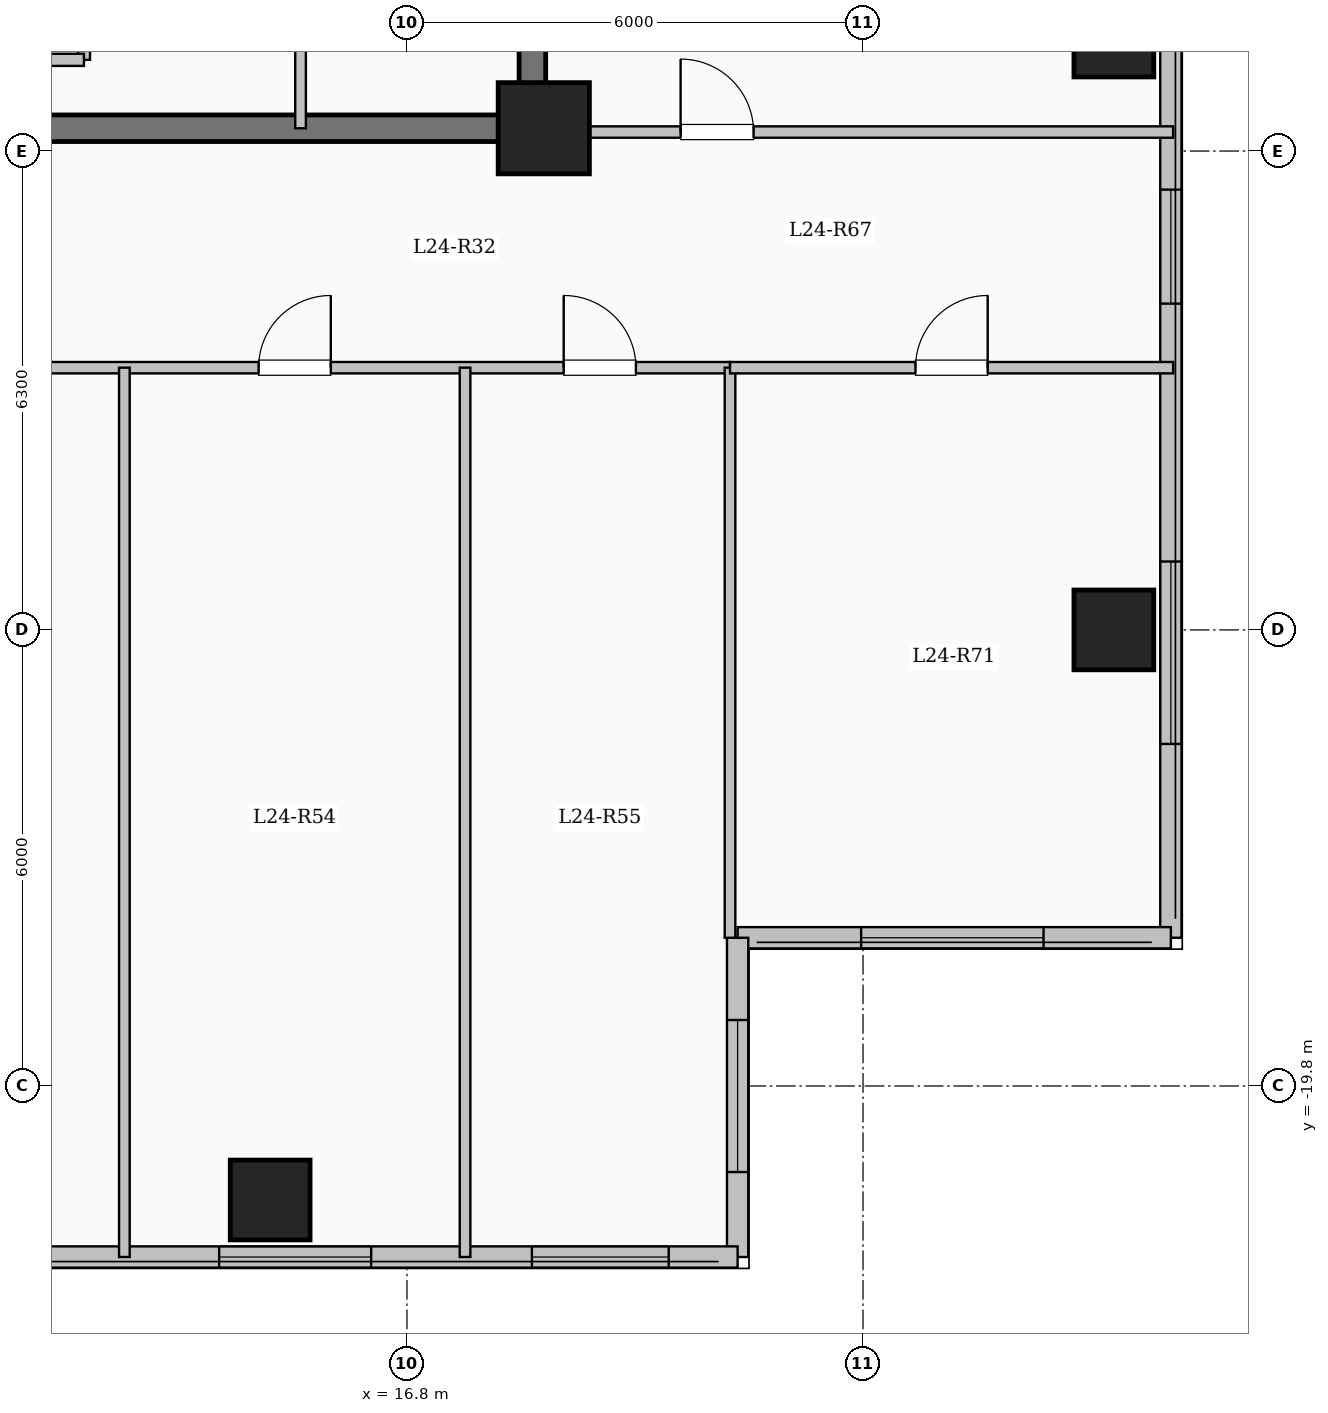
"""IFC4 building model, lengths in metres.
Left out: names, types, materials, properties, quantities, classifications, styles, units other than length and angle.
Written with IfcOpenShell. Run it as: python <this file> out.ifc"""

import sys

from ifc_helpers import new_model, si_unit, direction, frame, frame_2d, origin, origin_2d, place, context, subcontext, project, spatial, rectangle, extrude, element, fill, save


model = new_model("IFC4")
c1 = context("Model", 3, precision=1e-05, world=origin(), true_north=direction((0.0, 1.0)))
c2 = subcontext(c1, "Body", "Model", "MODEL_VIEW")
j1 = project(units=[si_unit("LENGTHUNIT", "METRE"), si_unit("PLANEANGLEUNIT", "RADIAN")], contexts=[c1])
p1 = place(None, origin())
s1 = spatial("IfcSite", under=j1, at=p1, CompositionType="ELEMENT")
p2 = place(p1, origin())
s2 = spatial("IfcBuilding", under=s1, at=p2, CompositionType="ELEMENT")
p3 = place(p2, frame((0.0, 0.0, 91.7)))
s3 = spatial("IfcBuildingStorey", under=s2, at=p3, CompositionType="ELEMENT", Elevation=91.7)
p4 = place(p3, frame((18.6, -7.2, 0.0), z_axis=(0.0, 0.0, 1.0), x_axis=(1.0, 0.0, 0.0)))
e1 = element("IfcColumn", 1, at=p4, inside=s3, PredefinedType="COLUMN", context=c2, shape_type="SweptSolid", body=[
    extrude(rectangle(XDim=1.2, YDim=1.2, at=origin_2d()), origin(), (0.0, 0.0, 1.0), 3.35),
])
for number, where, z_axis, x_axis in (
    (2, (15.0, -21.3, 0.0), (0.0, 0.0, 1.0), (1.0, 0.0, 0.0)),
    (3, (26.1, -13.8, 0.0), (0.0, 0.0, 1.0), (1.0, 0.0, 0.0)),
    (4, (26.1, -6.0, 0.0), (0.0, 0.0, 1.0), (1.0, 0.0, 0.0)),
):
    element("IfcColumn", number, at=place(p3, frame(where, z_axis=z_axis, x_axis=x_axis)), inside=s3, PredefinedType="COLUMN", context=c2, shape_type="SweptSolid", body=[
        extrude(rectangle(XDim=1.05, YDim=1.05, at=origin_2d()), origin(), (0.0, 0.0, 1.0), 3.35),
    ])
p5 = place(p3, frame((26.85, 17.85, 0.0), z_axis=(0.0, 0.0, 1.0), x_axis=(0.0, -1.0, 0.0)))
e5 = element("IfcWall", 5, at=p5, inside=s3, PredefinedType="SOLIDWALL", context=c2, shape_type="SweptSolid", body=[
    extrude(rectangle(XDim=35.7, YDim=0.28, at=frame_2d((17.85, 0.0))), origin(), (0.0, 0.0, 1.0), 3.1),
])
p6 = place(p5, frame((1.675, 0.0, 0.9)))
e6 = element("IfcOpeningElement", 6, at=p6, cuts=e5, PredefinedType="OPENING", context=c2, shape_type="SweptSolid", body=[
    extrude(rectangle(XDim=2.0, YDim=1.7, at=frame_2d((1.0, 0.85))), frame((0.0, 0.15, 0.0), z_axis=(0.0, -1.0, 0.0), x_axis=(1.0, 0.0, 0.0)), (0.0, 0.0, 1.0), 0.3),
])
p7 = place(p5, frame((5.725, 0.0, 0.95)))
e7 = element("IfcOpeningElement", 7, at=p7, cuts=e5, PredefinedType="OPENING", context=c2, shape_type="SweptSolid", body=[
    extrude(rectangle(XDim=1.0, YDim=1.5, at=frame_2d((0.5, 0.75))), frame((0.0, 0.15, 0.0), z_axis=(0.0, -1.0, 0.0), x_axis=(1.0, 0.0, 0.0)), (0.0, 0.0, 1.0), 0.3),
])
p8 = place(p5, frame((8.975, 0.0, 0.9)))
e8 = element("IfcOpeningElement", 8, at=p8, cuts=e5, PredefinedType="OPENING", context=c2, shape_type="SweptSolid", body=[
    extrude(rectangle(XDim=2.0, YDim=1.7, at=frame_2d((1.0, 0.85))), frame((0.0, 0.15, 0.0), z_axis=(0.0, -1.0, 0.0), x_axis=(1.0, 0.0, 0.0)), (0.0, 0.0, 1.0), 0.3),
])
p9 = place(p5, frame((13.725, 0.0, 0.9)))
e9 = element("IfcOpeningElement", 9, at=p9, cuts=e5, PredefinedType="OPENING", context=c2, shape_type="SweptSolid", body=[
    extrude(rectangle(XDim=1.8, YDim=1.65, at=frame_2d((0.9, 0.825))), frame((0.0, 0.15, 0.0), z_axis=(0.0, -1.0, 0.0), x_axis=(1.0, 0.0, 0.0)), (0.0, 0.0, 1.0), 0.3),
])
p10 = place(p5, frame((19.55, 0.0, 0.9)))
e10 = element("IfcOpeningElement", 10, at=p10, cuts=e5, PredefinedType="OPENING", context=c2, shape_type="SweptSolid", body=[
    extrude(rectangle(XDim=2.4, YDim=1.8, at=frame_2d((1.2, 0.9))), frame((0.0, 0.15, 0.0), z_axis=(0.0, -1.0, 0.0), x_axis=(1.0, 0.0, 0.0)), (0.0, 0.0, 1.0), 0.3),
])
p11 = place(p5, frame((25.857, 0.0, 0.9)))
e11 = element("IfcOpeningElement", 11, at=p11, cuts=e5, PredefinedType="OPENING", context=c2, shape_type="SweptSolid", body=[
    extrude(rectangle(XDim=1.5, YDim=1.65, at=frame_2d((0.75, 0.825))), frame((0.0, 0.15, 0.0), z_axis=(0.0, -1.0, 0.0), x_axis=(1.0, 0.0, 0.0)), (0.0, 0.0, 1.0), 0.3),
])
p12 = place(p5, frame((30.75, 0.0, 0.9)))
e12 = element("IfcOpeningElement", 12, at=p12, cuts=e5, PredefinedType="OPENING", context=c2, shape_type="SweptSolid", body=[
    extrude(rectangle(XDim=2.4, YDim=1.8, at=frame_2d((1.2, 0.9))), frame((0.0, 0.15, 0.0), z_axis=(0.0, -1.0, 0.0), x_axis=(1.0, 0.0, 0.0)), (0.0, 0.0, 1.0), 0.3),
])
p13 = place(p3, frame((26.85, -17.85, 0.0), z_axis=(0.0, 0.0, 1.0), x_axis=(-1.0, 0.0, 0.0)))
e13 = element("IfcWall", 13, at=p13, inside=s3, PredefinedType="SOLIDWALL", context=c2, shape_type="SweptSolid", body=[
    extrude(rectangle(XDim=5.7, YDim=0.28, at=frame_2d((2.85, 0.0))), origin(), (0.0, 0.0, 1.0), 3.1),
])
p14 = place(p13, frame((1.675, 0.0, 0.9)))
e14 = element("IfcOpeningElement", 14, at=p14, cuts=e13, PredefinedType="OPENING", context=c2, shape_type="SweptSolid", body=[
    extrude(rectangle(XDim=2.4, YDim=1.8, at=frame_2d((1.2, 0.9))), frame((0.0, 0.15, 0.0), z_axis=(0.0, -1.0, 0.0), x_axis=(1.0, 0.0, 0.0)), (0.0, 0.0, 1.0), 0.3),
])
p15 = place(p3, frame((21.15, -17.85, 0.0), z_axis=(0.0, 0.0, 1.0), x_axis=(0.0, -1.0, 0.0)))
e15 = element("IfcWall", 15, at=p15, inside=s3, PredefinedType="SOLIDWALL", context=c2, shape_type="SweptSolid", body=[
    extrude(rectangle(XDim=4.2, YDim=0.28, at=frame_2d((2.1, 0.0))), origin(), (0.0, 0.0, 1.0), 3.1),
])
p16 = place(p15, frame((1.082, 0.0, 0.9)))
e16 = element("IfcOpeningElement", 16, at=p16, cuts=e15, PredefinedType="OPENING", context=c2, shape_type="SweptSolid", body=[
    extrude(rectangle(XDim=2.0, YDim=1.7, at=frame_2d((1.0, 0.85))), frame((0.0, 0.15, 0.0), z_axis=(0.0, -1.0, 0.0), x_axis=(1.0, 0.0, 0.0)), (0.0, 0.0, 1.0), 0.3),
])
p17 = place(p3, frame((21.15, -22.05, 0.0), z_axis=(0.0, 0.0, 1.0), x_axis=(-1.0, 0.0, 0.0)))
e17 = element("IfcWall", 17, at=p17, inside=s3, PredefinedType="SOLIDWALL", context=c2, shape_type="SweptSolid", body=[
    extrude(rectangle(XDim=13.8, YDim=0.28, at=frame_2d((6.9, 0.0))), origin(), (0.0, 0.0, 1.0), 3.1),
])
p18 = place(p17, frame((0.906, 0.0, 0.9)))
e18 = element("IfcOpeningElement", 18, at=p18, cuts=e17, PredefinedType="OPENING", context=c2, shape_type="SweptSolid", body=[
    extrude(rectangle(XDim=1.8, YDim=1.65, at=frame_2d((0.9, 0.825))), frame((0.0, 0.15, 0.0), z_axis=(0.0, -1.0, 0.0), x_axis=(1.0, 0.0, 0.0)), (0.0, 0.0, 1.0), 0.3),
])
p19 = place(p17, frame((4.821, 0.0, 0.9)))
e19 = element("IfcOpeningElement", 19, at=p19, cuts=e17, PredefinedType="OPENING", context=c2, shape_type="SweptSolid", body=[
    extrude(rectangle(XDim=2.0, YDim=1.7, at=frame_2d((1.0, 0.85))), frame((0.0, 0.15, 0.0), z_axis=(0.0, -1.0, 0.0), x_axis=(1.0, 0.0, 0.0)), (0.0, 0.0, 1.0), 0.3),
])
p20 = place(p17, frame((9.337, 0.0, 0.9)))
e20 = element("IfcOpeningElement", 20, at=p20, cuts=e17, PredefinedType="OPENING", context=c2, shape_type="SweptSolid", body=[
    extrude(rectangle(XDim=2.0, YDim=1.7, at=frame_2d((1.0, 0.85))), frame((0.0, 0.15, 0.0), z_axis=(0.0, -1.0, 0.0), x_axis=(1.0, 0.0, 0.0)), (0.0, 0.0, 1.0), 0.3),
])
p21 = place(p17, frame((12.803, 0.0, 0.95)))
e21 = element("IfcOpeningElement", 21, at=p21, cuts=e17, PredefinedType="OPENING", context=c2, shape_type="SweptSolid", body=[
    extrude(rectangle(XDim=0.85, YDim=1.5, at=frame_2d((0.425, 0.75))), frame((0.0, 0.15, 0.0), z_axis=(0.0, -1.0, 0.0), x_axis=(1.0, 0.0, 0.0)), (0.0, 0.0, 1.0), 0.3),
])
p22 = place(p3, frame((12.55, -6.3, 0.0), z_axis=(0.0, 0.0, 1.0), x_axis=(0.0, 1.0, 0.0)))
e22 = element("IfcWall", 22, at=p22, inside=s3, PredefinedType="SOLIDWALL", context=c2, shape_type="SweptSolid", body=[
    extrude(rectangle(XDim=2.6, YDim=0.16, at=frame_2d((1.3, 0.0))), origin(), (0.0, 0.0, 1.0), 3.1),
])
p23 = place(p3, frame((10.25, -6.3, 0.0), z_axis=(0.0, 0.0, 1.0), x_axis=(1.0, 0.0, 0.0)))
e23 = element("IfcWall", 23, at=p23, inside=s3, PredefinedType="SOLIDWALL", context=c2, shape_type="SweptSolid", body=[
    extrude(rectangle(XDim=2.3, YDim=0.16, at=frame_2d((1.15, 0.0))), origin(), (0.0, 0.0, 1.0), 3.1),
])
p24 = place(p3, frame((18.45, -7.375, 0.0), z_axis=(0.0, 0.0, 1.0), x_axis=(0.0, 1.0, 0.0)))
e24 = element("IfcWall", 24, at=p24, inside=s3, PredefinedType="SHEAR", context=c2, shape_type="SweptSolid", body=[
    extrude(rectangle(XDim=14.05, YDim=0.35, at=frame_2d((7.025, 0.0))), origin(), (0.0, 0.0, 1.0), 3.35),
])
p25 = place(p3, frame((10.075, -7.2, 0.0), z_axis=(0.0, 0.0, 1.0), x_axis=(1.0, 0.0, 0.0)))
e25 = element("IfcWall", 25, at=p25, inside=s3, PredefinedType="SHEAR", context=c2, shape_type="SweptSolid", body=[
    extrude(rectangle(XDim=8.55, YDim=0.35, at=frame_2d((4.275, 0.0))), origin(), (0.0, 0.0, 1.0), 3.35),
])
p26 = place(p3, frame((15.4, -7.2, 0.0), z_axis=(0.0, 0.0, 1.0), x_axis=(0.0, 1.0, 0.0)))
e26 = element("IfcWall", 26, at=p26, inside=s3, PredefinedType="PARTITIONING", context=c2, shape_type="SweptSolid", body=[
    extrude(rectangle(XDim=10.45, YDim=0.14, at=frame_2d((5.225, 0.0))), origin(), (0.0, 0.0, 1.0), 3.1),
])
p27 = place(p26, frame((9.25, 0.0, 0.0)))
e27 = element("IfcOpeningElement", 27, at=p27, cuts=e26, PredefinedType="OPENING", context=c2, shape_type="SweptSolid", body=[
    extrude(rectangle(XDim=0.9, YDim=2.08, at=frame_2d((0.45, 1.04))), frame((0.0, 0.08, 0.0), z_axis=(0.0, -1.0, 0.0), x_axis=(1.0, 0.0, 0.0)), (0.0, 0.0, 1.0), 0.16),
])
p28 = place(p3, frame((8.55, -10.35, 0.0), z_axis=(0.0, 0.0, 1.0), x_axis=(1.0, 0.0, 0.0)))
e28 = element("IfcWall", 28, at=p28, inside=s3, PredefinedType="PARTITIONING", context=c2, shape_type="SweptSolid", body=[
    extrude(rectangle(XDim=12.5, YDim=0.15, at=frame_2d((6.25, 0.0))), origin(), (0.0, 0.0, 1.0), 3.1),
])
p29 = place(p28, frame((1.786, 0.0, 0.0)))
e29 = element("IfcOpeningElement", 29, at=p29, cuts=e28, PredefinedType="OPENING", context=c2, shape_type="SweptSolid", body=[
    extrude(rectangle(XDim=0.95, YDim=2.15, at=frame_2d((0.475, 1.075))), frame((0.0, 0.085, 0.0), z_axis=(0.0, -1.0, 0.0), x_axis=(1.0, 0.0, 0.0)), (0.0, 0.0, 1.0), 0.17),
])
p30 = place(p28, frame((6.298, 0.0, 0.0)))
e30 = element("IfcOpeningElement", 30, at=p30, cuts=e28, PredefinedType="OPENING", context=c2, shape_type="SweptSolid", body=[
    extrude(rectangle(XDim=0.95, YDim=2.15, at=frame_2d((0.475, 1.075))), frame((0.0, 0.085, 0.0), z_axis=(0.0, -1.0, 0.0), x_axis=(1.0, 0.0, 0.0)), (0.0, 0.0, 1.0), 0.17),
])
p31 = place(p28, frame((10.312, 0.0, 0.0)))
e31 = element("IfcOpeningElement", 31, at=p31, cuts=e28, PredefinedType="OPENING", context=c2, shape_type="SweptSolid", body=[
    extrude(rectangle(XDim=0.95, YDim=2.15, at=frame_2d((0.475, 1.075))), frame((0.0, 0.085, 0.0), z_axis=(0.0, -1.0, 0.0), x_axis=(1.0, 0.0, 0.0)), (0.0, 0.0, 1.0), 0.17),
])
for number, where, z_axis, x_axis in (
    (32, (13.082, -22.05, 0.0), (0.0, 0.0, 1.0), (0.0, 1.0, 0.0)),
    (33, (17.564, -22.05, 0.0), (0.0, 0.0, 1.0), (0.0, 1.0, 0.0)),
):
    element("IfcWall", number, at=place(p3, frame(where, z_axis=z_axis, x_axis=x_axis)), inside=s3, PredefinedType="PARTITIONING", context=c2, shape_type="SweptSolid", body=[
        extrude(rectangle(XDim=11.7, YDim=0.14, at=frame_2d((5.85, 0.0))), origin(), (0.0, 0.0, 1.0), 3.1),
    ])
p32 = place(p3, frame((18.45, -7.25, 0.0), z_axis=(0.0, 0.0, 1.0), x_axis=(1.0, 0.0, 0.0)))
e34 = element("IfcWall", 34, at=p32, inside=s3, PredefinedType="PARTITIONING", context=c2, shape_type="SweptSolid", body=[
    extrude(rectangle(XDim=8.43, YDim=0.15, at=frame_2d((4.215, 0.0))), origin(), (0.0, 0.0, 1.0), 3.1),
])
p33 = place(p32, frame((1.95, 0.0, 0.0)))
e35 = element("IfcOpeningElement", 35, at=p33, cuts=e34, PredefinedType="OPENING", context=c2, shape_type="SweptSolid", body=[
    extrude(rectangle(XDim=0.96, YDim=2.15, at=frame_2d((0.48, 1.075))), frame((0.0, 0.085, 0.0), z_axis=(0.0, -1.0, 0.0), x_axis=(1.0, 0.0, 0.0)), (0.0, 0.0, 1.0), 0.17),
])
p34 = place(p3, frame((21.05, -17.85, 0.0), z_axis=(0.0, 0.0, 1.0), x_axis=(0.0, 1.0, 0.0)))
e36 = element("IfcWall", 36, at=p34, inside=s3, PredefinedType="PARTITIONING", context=c2, shape_type="SweptSolid", body=[
    extrude(rectangle(XDim=7.5, YDim=0.14, at=frame_2d((3.75, 0.0))), origin(), (0.0, 0.0, 1.0), 3.1),
])
p35 = place(p3, frame((21.05, -10.35, 0.0), z_axis=(0.0, 0.0, 1.0), x_axis=(1.0, 0.0, 0.0)))
e37 = element("IfcWall", 37, at=p35, inside=s3, PredefinedType="PARTITIONING", context=c2, shape_type="SweptSolid", body=[
    extrude(rectangle(XDim=5.83, YDim=0.15, at=frame_2d((2.915, 0.0))), origin(), (0.0, 0.0, 1.0), 3.1),
])
p36 = place(p35, frame((2.44, 0.0, 0.0)))
e38 = element("IfcOpeningElement", 38, at=p36, cuts=e37, PredefinedType="OPENING", context=c2, shape_type="SweptSolid", body=[
    extrude(rectangle(XDim=0.95, YDim=2.15, at=frame_2d((0.475, 1.075))), frame((0.0, 0.085, 0.0), z_axis=(0.0, -1.0, 0.0), x_axis=(1.0, 0.0, 0.0)), (0.0, 0.0, 1.0), 0.17),
])
p37 = place(p11, origin())
e39 = element("IfcWindow", 39, at=p37, inside=s3, PartitioningType="SINGLE_PANEL", PredefinedType="WINDOW", context=c2, shape_type="SweptSolid", body=[
    extrude(rectangle(XDim=1.5, YDim=1.65, at=frame_2d((0.75, 0.825))), frame((0.0, 0.03, 0.0), z_axis=(0.0, -1.0, 0.0), x_axis=(1.0, 0.0, 0.0)), (0.0, 0.0, 1.0), 0.06),
])
fill(e11, e39)
p38 = place(p12, origin())
e40 = element("IfcWindow", 40, at=p38, inside=s3, PartitioningType="SINGLE_PANEL", PredefinedType="WINDOW", context=c2, shape_type="SweptSolid", body=[
    extrude(rectangle(XDim=2.4, YDim=1.8, at=frame_2d((1.2, 0.9))), frame((0.0, 0.03, 0.0), z_axis=(0.0, -1.0, 0.0), x_axis=(1.0, 0.0, 0.0)), (0.0, 0.0, 1.0), 0.06),
])
fill(e12, e40)
p39 = place(p14, origin())
e41 = element("IfcWindow", 41, at=p39, inside=s3, PartitioningType="SINGLE_PANEL", PredefinedType="WINDOW", context=c2, shape_type="SweptSolid", body=[
    extrude(rectangle(XDim=2.4, YDim=1.8, at=frame_2d((1.2, 0.9))), frame((0.0, 0.03, 0.0), z_axis=(0.0, -1.0, 0.0), x_axis=(1.0, 0.0, 0.0)), (0.0, 0.0, 1.0), 0.06),
])
fill(e14, e41)
p40 = place(p16, origin())
e42 = element("IfcWindow", 42, at=p40, inside=s3, PartitioningType="SINGLE_PANEL", PredefinedType="WINDOW", context=c2, shape_type="SweptSolid", body=[
    extrude(rectangle(XDim=2.0, YDim=1.7, at=frame_2d((1.0, 0.85))), frame((0.0, 0.03, 0.0), z_axis=(0.0, -1.0, 0.0), x_axis=(1.0, 0.0, 0.0)), (0.0, 0.0, 1.0), 0.06),
])
fill(e16, e42)
p41 = place(p18, origin())
e43 = element("IfcWindow", 43, at=p41, inside=s3, PartitioningType="SINGLE_PANEL", PredefinedType="WINDOW", context=c2, shape_type="SweptSolid", body=[
    extrude(rectangle(XDim=1.8, YDim=1.65, at=frame_2d((0.9, 0.825))), frame((0.0, 0.03, 0.0), z_axis=(0.0, -1.0, 0.0), x_axis=(1.0, 0.0, 0.0)), (0.0, 0.0, 1.0), 0.06),
])
fill(e18, e43)
p42 = place(p19, origin())
e44 = element("IfcWindow", 44, at=p42, inside=s3, PartitioningType="SINGLE_PANEL", PredefinedType="WINDOW", context=c2, shape_type="SweptSolid", body=[
    extrude(rectangle(XDim=2.0, YDim=1.7, at=frame_2d((1.0, 0.85))), frame((0.0, 0.03, 0.0), z_axis=(0.0, -1.0, 0.0), x_axis=(1.0, 0.0, 0.0)), (0.0, 0.0, 1.0), 0.06),
])
fill(e19, e44)
p43 = place(p30, origin())
e45 = element("IfcDoor", 45, at=p43, inside=s3, OperationType="SINGLE_SWING_RIGHT", PredefinedType="DOOR", context=c2, shape_type="SweptSolid", body=[
    extrude(rectangle(XDim=0.95, YDim=2.15, at=frame_2d((0.475, 1.075))), frame((0.0, 0.025, 0.0), z_axis=(0.0, -1.0, 0.0), x_axis=(1.0, 0.0, 0.0)), (0.0, 0.0, 1.0), 0.05),
])
fill(e30, e45)
p44 = place(p31, origin())
e46 = element("IfcDoor", 46, at=p44, inside=s3, OperationType="SINGLE_SWING_LEFT", PredefinedType="DOOR", context=c2, shape_type="SweptSolid", body=[
    extrude(rectangle(XDim=0.95, YDim=2.15, at=frame_2d((0.475, 1.075))), frame((0.0, 0.025, 0.0), z_axis=(0.0, -1.0, 0.0), x_axis=(1.0, 0.0, 0.0)), (0.0, 0.0, 1.0), 0.05),
])
fill(e31, e46)
p45 = place(p36, origin())
e47 = element("IfcDoor", 47, at=p45, inside=s3, OperationType="SINGLE_SWING_RIGHT", PredefinedType="DOOR", context=c2, shape_type="SweptSolid", body=[
    extrude(rectangle(XDim=0.95, YDim=2.15, at=frame_2d((0.475, 1.075))), frame((0.0, 0.025, 0.0), z_axis=(0.0, -1.0, 0.0), x_axis=(1.0, 0.0, 0.0)), (0.0, 0.0, 1.0), 0.05),
])
fill(e38, e47)
p46 = place(p33, origin())
e48 = element("IfcDoor", 48, at=p46, inside=s3, OperationType="SINGLE_SWING_LEFT", PredefinedType="DOOR", context=c2, shape_type="SweptSolid", body=[
    extrude(rectangle(XDim=0.96, YDim=2.15, at=frame_2d((0.48, 1.075))), frame((0.0, 0.025, 0.0), z_axis=(0.0, -1.0, 0.0), x_axis=(1.0, 0.0, 0.0)), (0.0, 0.0, 1.0), 0.05),
])
fill(e35, e48)
save(model, sys.argv[1])
